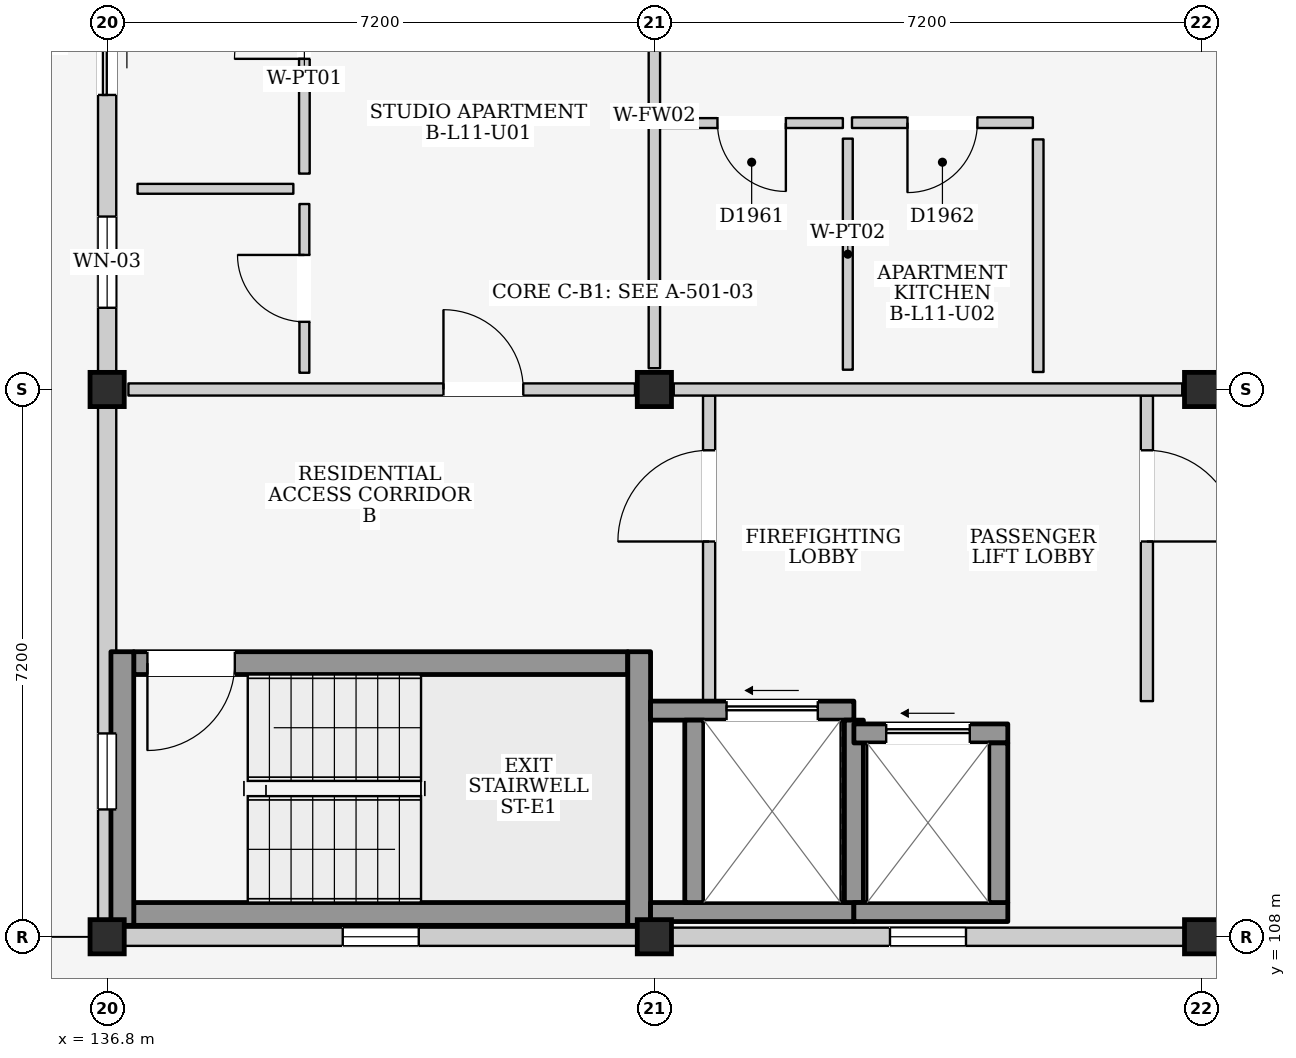
"""IFC4 building model, lengths in metres.
Left out: names, types, materials, properties, quantities, classifications, styles, units other than length and angle.
Written with IfcOpenShell. Run it as: python <this file> out.ifc"""

import sys

from ifc_helpers import new_model, si_unit, direction, frame, frame_2d, origin, origin_2d, place, context, subcontext, project, spatial, rectangle, extrude, element, fill, save


model = new_model("IFC4")
c1 = context("Model", 3, precision=1e-05, world=origin(), true_north=direction((0.0, 1.0)))
c2 = subcontext(c1, "Body", "Model", "MODEL_VIEW")
j1 = project(units=[si_unit("LENGTHUNIT", "METRE"), si_unit("PLANEANGLEUNIT", "RADIAN")], contexts=[c1])
p1 = place(None, origin())
s1 = spatial("IfcSite", under=j1, at=p1, CompositionType="ELEMENT")
p2 = place(p1, origin())
s2 = spatial("IfcBuilding", under=s1, at=p2, CompositionType="ELEMENT")
p3 = place(p2, frame((0.0, 0.0, 38.0)))
s3 = spatial("IfcBuildingStorey", under=s2, at=p3, CompositionType="ELEMENT", Elevation=38.0)
for number, where, z_axis, x_axis in (
    (1, (136.8, 108.0, 0.0), (0.0, 0.0, 1.0), (1.0, 0.0, 0.0)),
    (2, (136.8, 115.2, 0.0), (0.0, 0.0, 1.0), (1.0, 0.0, 0.0)),
    (3, (144.0, 108.0, 0.0), (0.0, 0.0, 1.0), (1.0, 0.0, 0.0)),
    (4, (144.0, 115.2, 0.0), (0.0, 0.0, 1.0), (1.0, 0.0, 0.0)),
    (5, (151.2, 108.0, 0.0), (0.0, 0.0, 1.0), (1.0, 0.0, 0.0)),
    (6, (151.2, 115.2, 0.0), (0.0, 0.0, 1.0), (1.0, 0.0, 0.0)),
):
    element("IfcColumn", number, at=place(p3, frame(where, z_axis=z_axis, x_axis=x_axis)), inside=s3, PredefinedType="COLUMN", context=c2, shape_type="SweptSolid", body=[
        extrude(rectangle(XDim=0.45, YDim=0.45, at=origin_2d()), origin(), (0.0, 0.0, 1.0), 3.2),
    ])
p4 = place(p3, frame((137.025, 108.0, 0.0), z_axis=(0.0, 0.0, 1.0), x_axis=(1.0, 0.0, 0.0)))
e7 = element("IfcWall", 7, at=p4, inside=s3, PredefinedType="ELEMENTEDWALL", context=c2, shape_type="SweptSolid", body=[
    extrude(rectangle(XDim=6.75, YDim=0.24, at=frame_2d((3.375, 0.0))), origin(), (0.0, 0.0, 1.0), 2.375),
])
p5 = place(p4, frame((2.875, 0.0, 1.2)))
e8 = element("IfcOpeningElement", 8, at=p5, cuts=e7, PredefinedType="OPENING", context=c2, shape_type="SweptSolid", body=[
    extrude(rectangle(XDim=1.0, YDim=0.9, at=frame_2d((0.5, 0.45))), frame((0.0, 0.135, 0.0), z_axis=(0.0, -1.0, 0.0), x_axis=(1.0, 0.0, 0.0)), (0.0, 0.0, 1.0), 0.27),
])
p6 = place(p3, frame((136.8, 108.225, 0.0), z_axis=(0.0, 0.0, 1.0), x_axis=(0.0, 1.0, 0.0)))
e9 = element("IfcWall", 9, at=p6, inside=s3, PredefinedType="ELEMENTEDWALL", context=c2, shape_type="SweptSolid", body=[
    extrude(rectangle(XDim=6.75, YDim=0.24, at=frame_2d((3.375, 0.0))), origin(), (0.0, 0.0, 1.0), 2.475),
])
p7 = place(p6, frame((1.45, 0.0, 1.2)))
e10 = element("IfcOpeningElement", 10, at=p7, cuts=e9, PredefinedType="OPENING", context=c2, shape_type="SweptSolid", body=[
    extrude(rectangle(XDim=1.0, YDim=0.9, at=frame_2d((0.5, 0.45))), frame((0.0, 0.135, 0.0), z_axis=(0.0, -1.0, 0.0), x_axis=(1.0, 0.0, 0.0)), (0.0, 0.0, 1.0), 0.27),
])
p8 = place(p3, frame((136.8, 115.425, 0.0), z_axis=(0.0, 0.0, 1.0), x_axis=(0.0, 1.0, 0.0)))
e11 = element("IfcWall", 11, at=p8, inside=s3, PredefinedType="ELEMENTEDWALL", context=c2, shape_type="SweptSolid", body=[
    extrude(rectangle(XDim=6.75, YDim=0.24, at=frame_2d((3.375, 0.0))), origin(), (0.0, 0.0, 1.0), 2.475),
])
p9 = place(p8, frame((3.65, 0.0, 0.0)))
e12 = element("IfcOpeningElement", 12, at=p9, cuts=e11, PredefinedType="OPENING", context=c2, shape_type="SweptSolid", body=[
    extrude(rectangle(XDim=1.4, YDim=2.1, at=frame_2d((0.7, 1.05))), frame((0.0, 0.135, 0.0), z_axis=(0.0, -1.0, 0.0), x_axis=(1.0, 0.0, 0.0)), (0.0, 0.0, 1.0), 0.27),
])
p10 = place(p8, frame((0.85, 0.0, 0.95)))
e13 = element("IfcOpeningElement", 13, at=p10, cuts=e11, PredefinedType="OPENING", context=c2, shape_type="SweptSolid", body=[
    extrude(rectangle(XDim=1.2, YDim=1.35, at=frame_2d((0.6, 0.675))), frame((0.0, 0.135, 0.0), z_axis=(0.0, -1.0, 0.0), x_axis=(1.0, 0.0, 0.0)), (0.0, 0.0, 1.0), 0.27),
])
p11 = place(p3, frame((144.225, 108.0, 0.0), z_axis=(0.0, 0.0, 1.0), x_axis=(1.0, 0.0, 0.0)))
e14 = element("IfcWall", 14, at=p11, inside=s3, PredefinedType="ELEMENTEDWALL", context=c2, shape_type="SweptSolid", body=[
    extrude(rectangle(XDim=6.75, YDim=0.24, at=frame_2d((3.375, 0.0))), origin(), (0.0, 0.0, 1.0), 2.375),
])
p12 = place(p11, frame((2.875, 0.0, 1.2)))
e15 = element("IfcOpeningElement", 15, at=p12, cuts=e14, PredefinedType="OPENING", context=c2, shape_type="SweptSolid", body=[
    extrude(rectangle(XDim=1.0, YDim=0.9, at=frame_2d((0.5, 0.45))), frame((0.0, 0.135, 0.0), z_axis=(0.0, -1.0, 0.0), x_axis=(1.0, 0.0, 0.0)), (0.0, 0.0, 1.0), 0.27),
])
p13 = place(p3, frame((137.15, 108.3, 0.0), z_axis=(0.0, 0.0, 1.0), x_axis=(1.0, 0.0, 0.0)))
e16 = element("IfcWall", 16, at=p13, inside=s3, PredefinedType="SHEAR", context=c2, shape_type="SweptSolid", body=[
    extrude(rectangle(XDim=6.5, YDim=0.3, at=frame_2d((3.25, 0.0))), origin(), (0.0, 0.0, 1.0), 2.99),
])
p14 = place(p3, frame((137.15, 111.6, 0.0), z_axis=(0.0, 0.0, 1.0), x_axis=(1.0, 0.0, 0.0)))
e17 = element("IfcWall", 17, at=p14, inside=s3, PredefinedType="SHEAR", context=c2, shape_type="SweptSolid", body=[
    extrude(rectangle(XDim=6.5, YDim=0.3, at=frame_2d((3.25, 0.0))), origin(), (0.0, 0.0, 1.0), 2.99),
])
p15 = place(p14, frame((0.18, 0.0, 0.0)))
e18 = element("IfcOpeningElement", 18, at=p15, cuts=e17, PredefinedType="OPENING", context=c2, shape_type="SweptSolid", body=[
    extrude(rectangle(XDim=1.15, YDim=2.2, at=frame_2d((0.575, 1.1))), frame((0.0, 0.165, 0.0), z_axis=(0.0, -1.0, 0.0), x_axis=(1.0, 0.0, 0.0)), (0.0, 0.0, 1.0), 0.33),
])
for number, where, z_axis, x_axis in (
    (19, (137.0, 108.15, 0.0), (0.0, 0.0, 1.0), (0.0, 1.0, 0.0)),
    (20, (143.8, 108.15, 0.0), (0.0, 0.0, 1.0), (0.0, 1.0, 0.0)),
):
    element("IfcWall", number, at=place(p3, frame(where, z_axis=z_axis, x_axis=x_axis)), inside=s3, PredefinedType="SHEAR", context=c2, shape_type="SweptSolid", body=[
        extrude(rectangle(XDim=3.6, YDim=0.3, at=frame_2d((1.8, 0.0))), origin(), (0.0, 0.0, 1.0), 2.99),
    ])
p16 = place(p3, frame((144.72, 111.1, 0.0), z_axis=(0.0, 0.0, 1.0), x_axis=(0.0, 1.0, 0.0)))
e21 = element("IfcWall", 21, at=p16, inside=s3, PredefinedType="PARTITIONING", context=c2, shape_type="SweptSolid", body=[
    extrude(rectangle(XDim=4.02, YDim=0.16, at=frame_2d((2.01, 0.0))), origin(), (0.0, 0.0, 1.0), 2.99),
])
p17 = place(p16, frame((2.1, 0.0, 0.0)))
e22 = element("IfcOpeningElement", 22, at=p17, cuts=e21, PredefinedType="OPENING", context=c2, shape_type="SweptSolid", body=[
    extrude(rectangle(XDim=1.2, YDim=2.2, at=frame_2d((0.6, 1.1))), frame((0.0, 0.095, 0.0), z_axis=(0.0, -1.0, 0.0), x_axis=(1.0, 0.0, 0.0)), (0.0, 0.0, 1.0), 0.19),
])
p18 = place(p3, frame((150.48, 111.1, 0.0), z_axis=(0.0, 0.0, 1.0), x_axis=(0.0, 1.0, 0.0)))
e23 = element("IfcWall", 23, at=p18, inside=s3, PredefinedType="PARTITIONING", context=c2, shape_type="SweptSolid", body=[
    extrude(rectangle(XDim=4.02, YDim=0.16, at=frame_2d((2.01, 0.0))), origin(), (0.0, 0.0, 1.0), 2.99),
])
p19 = place(p18, frame((2.1, 0.0, 0.0)))
e24 = element("IfcOpeningElement", 24, at=p19, cuts=e23, PredefinedType="OPENING", context=c2, shape_type="SweptSolid", body=[
    extrude(rectangle(XDim=1.2, YDim=2.2, at=frame_2d((0.6, 1.1))), frame((0.0, 0.095, 0.0), z_axis=(0.0, -1.0, 0.0), x_axis=(1.0, 0.0, 0.0)), (0.0, 0.0, 1.0), 0.19),
])
p20 = place(p3, frame((143.95, 108.325, 0.0), z_axis=(0.0, 0.0, 1.0), x_axis=(1.0, 0.0, 0.0)))
e25 = element("IfcWall", 25, at=p20, inside=s3, PredefinedType="SHEAR", context=c2, shape_type="SweptSolid", body=[
    extrude(rectangle(XDim=2.675, YDim=0.25, at=frame_2d((1.337, 0.0))), origin(), (0.0, 0.0, 1.0), 2.99),
])
p21 = place(p3, frame((143.95, 110.975, 0.0), z_axis=(0.0, 0.0, 1.0), x_axis=(1.0, 0.0, 0.0)))
e26 = element("IfcWall", 26, at=p21, inside=s3, PredefinedType="SHEAR", context=c2, shape_type="SweptSolid", body=[
    extrude(rectangle(XDim=2.675, YDim=0.25, at=frame_2d((1.337, 0.0))), origin(), (0.0, 0.0, 1.0), 2.99),
])
p22 = place(p21, frame((1.0, 0.0, 0.0)))
e27 = element("IfcOpeningElement", 27, at=p22, cuts=e26, PredefinedType="OPENING", context=c2, shape_type="SweptSolid", body=[
    extrude(rectangle(XDim=1.2, YDim=2.25, at=frame_2d((0.6, 1.125))), frame((0.0, 0.14, 0.0), z_axis=(0.0, -1.0, 0.0), x_axis=(1.0, 0.0, 0.0)), (0.0, 0.0, 1.0), 0.28),
])
for number, where, z_axis, x_axis in (
    (28, (144.525, 108.45, 0.0), (0.0, 0.0, 1.0), (0.0, 1.0, 0.0)),
    (29, (146.625, 108.45, 0.0), (0.0, 0.0, 1.0), (0.0, 1.0, 0.0)),
):
    element("IfcWall", number, at=place(p3, frame(where, z_axis=z_axis, x_axis=x_axis)), inside=s3, PredefinedType="SHEAR", context=c2, shape_type="SweptSolid", body=[
        extrude(rectangle(XDim=2.4, YDim=0.25, at=frame_2d((1.2, 0.0))), origin(), (0.0, 0.0, 1.0), 2.99),
    ])
p23 = place(p3, frame((146.625, 108.325, 0.0), z_axis=(0.0, 0.0, 1.0), x_axis=(1.0, 0.0, 0.0)))
e30 = element("IfcWall", 30, at=p23, inside=s3, PredefinedType="SHEAR", context=c2, shape_type="SweptSolid", body=[
    extrude(rectangle(XDim=2.025, YDim=0.25, at=frame_2d((1.012, 0.0))), origin(), (0.0, 0.0, 1.0), 2.99),
])
p24 = place(p3, frame((146.625, 110.675, 0.0), z_axis=(0.0, 0.0, 1.0), x_axis=(1.0, 0.0, 0.0)))
e31 = element("IfcWall", 31, at=p24, inside=s3, PredefinedType="SHEAR", context=c2, shape_type="SweptSolid", body=[
    extrude(rectangle(XDim=2.025, YDim=0.25, at=frame_2d((1.012, 0.0))), origin(), (0.0, 0.0, 1.0), 2.99),
])
p25 = place(p24, frame((0.425, 0.0, 0.0)))
e32 = element("IfcOpeningElement", 32, at=p25, cuts=e31, PredefinedType="OPENING", context=c2, shape_type="SweptSolid", body=[
    extrude(rectangle(XDim=1.1, YDim=2.15, at=frame_2d((0.55, 1.075))), frame((0.0, 0.14, 0.0), z_axis=(0.0, -1.0, 0.0), x_axis=(1.0, 0.0, 0.0)), (0.0, 0.0, 1.0), 0.28),
])
p26 = place(p3, frame((148.525, 108.45, 0.0), z_axis=(0.0, 0.0, 1.0), x_axis=(0.0, 1.0, 0.0)))
e33 = element("IfcWall", 33, at=p26, inside=s3, PredefinedType="SHEAR", context=c2, shape_type="SweptSolid", body=[
    extrude(rectangle(XDim=2.1, YDim=0.25, at=frame_2d((1.05, 0.0))), origin(), (0.0, 0.0, 1.0), 2.99),
])
p27 = place(p3, frame((137.08, 115.2, 0.0), z_axis=(0.0, 0.0, 1.0), x_axis=(1.0, 0.0, 0.0)))
e34 = element("IfcWall", 34, at=p27, inside=s3, PredefinedType="PARTITIONING", context=c2, shape_type="SweptSolid", body=[
    extrude(rectangle(XDim=6.665, YDim=0.16, at=frame_2d((3.333, 0.0))), origin(), (0.0, 0.0, 1.0), 2.375),
])
p28 = place(p27, frame((4.145, 0.0, 0.0)))
e35 = element("IfcOpeningElement", 35, at=p28, cuts=e34, PredefinedType="OPENING", context=c2, shape_type="SweptSolid", body=[
    extrude(rectangle(XDim=1.05, YDim=2.15, at=frame_2d((0.525, 1.075))), frame((0.0, 0.095, 0.0), z_axis=(0.0, -1.0, 0.0), x_axis=(1.0, 0.0, 0.0)), (0.0, 0.0, 1.0), 0.19),
])
p29 = place(p3, frame((144.0, 115.48, 0.0), z_axis=(0.0, 0.0, 1.0), x_axis=(0.0, 1.0, 0.0)))
e36 = element("IfcWall", 36, at=p29, inside=s3, PredefinedType="PARTITIONING", context=c2, shape_type="SweptSolid", body=[
    extrude(rectangle(XDim=6.64, YDim=0.15, at=frame_2d((3.32, 0.0))), origin(), (0.0, 0.0, 1.0), 2.475),
])
p30 = place(p3, frame((137.2, 117.84, 0.0), z_axis=(0.0, 0.0, 1.0), x_axis=(1.0, 0.0, 0.0)))
e37 = element("IfcWall", 37, at=p30, inside=s3, PredefinedType="PARTITIONING", context=c2, shape_type="SweptSolid", body=[
    extrude(rectangle(XDim=2.05, YDim=0.13, at=frame_2d((1.025, 0.0))), origin(), (0.0, 0.0, 1.0), 2.99),
])
p31 = place(p3, frame((139.395, 115.42, 0.0), z_axis=(0.0, 0.0, 1.0), x_axis=(0.0, 1.0, 0.0)))
e38 = element("IfcWall", 38, at=p31, inside=s3, PredefinedType="PARTITIONING", context=c2, shape_type="SweptSolid", body=[
    extrude(rectangle(XDim=2.22, YDim=0.13, at=frame_2d((1.11, 0.0))), origin(), (0.0, 0.0, 1.0), 2.99),
])
p32 = place(p31, frame((0.67, 0.0, 0.0)))
e39 = element("IfcOpeningElement", 39, at=p32, cuts=e38, PredefinedType="OPENING", context=c2, shape_type="SweptSolid", body=[
    extrude(rectangle(XDim=0.88, YDim=2.1, at=frame_2d((0.44, 1.05))), frame((0.0, 0.08, 0.0), z_axis=(0.0, -1.0, 0.0), x_axis=(1.0, 0.0, 0.0)), (0.0, 0.0, 1.0), 0.16),
])
p33 = place(p3, frame((139.395, 118.04, 0.0), z_axis=(0.0, 0.0, 1.0), x_axis=(0.0, 1.0, 0.0)))
e40 = element("IfcWall", 40, at=p33, inside=s3, PredefinedType="PARTITIONING", context=c2, shape_type="SweptSolid", body=[
    extrude(rectangle(XDim=3.94, YDim=0.14, at=frame_2d((1.97, 0.0))), origin(), (0.0, 0.0, 1.0), 2.99),
])
p34 = place(p33, frame((1.51, 0.0, 0.0)))
e41 = element("IfcOpeningElement", 41, at=p34, cuts=e40, PredefinedType="OPENING", context=c2, shape_type="SweptSolid", body=[
    extrude(rectangle(XDim=0.92, YDim=2.1, at=frame_2d((0.46, 1.05))), frame((0.0, 0.085, 0.0), z_axis=(0.0, -1.0, 0.0), x_axis=(1.0, 0.0, 0.0)), (0.0, 0.0, 1.0), 0.17),
])
p35 = place(p3, frame((144.255, 115.2, 0.0), z_axis=(0.0, 0.0, 1.0), x_axis=(1.0, 0.0, 0.0)))
e42 = element("IfcWall", 42, at=p35, inside=s3, PredefinedType="PARTITIONING", context=c2, shape_type="SweptSolid", body=[
    extrude(rectangle(XDim=6.69, YDim=0.16, at=frame_2d((3.345, 0.0))), origin(), (0.0, 0.0, 1.0), 2.375),
])
p36 = place(p3, frame((144.08, 118.705, 0.0), z_axis=(0.0, 0.0, 1.0), x_axis=(1.0, 0.0, 0.0)))
e43 = element("IfcWall", 43, at=p36, inside=s3, PredefinedType="PARTITIONING", context=c2, shape_type="SweptSolid", body=[
    extrude(rectangle(XDim=2.4, YDim=0.13, at=frame_2d((1.2, 0.0))), origin(), (0.0, 0.0, 1.0), 2.99),
])
p37 = place(p36, frame((0.75, 0.0, 0.0)))
e44 = element("IfcOpeningElement", 44, at=p37, cuts=e43, PredefinedType="OPENING", context=c2, shape_type="SweptSolid", body=[
    extrude(rectangle(XDim=0.9, YDim=2.1, at=frame_2d((0.45, 1.05))), frame((0.0, 0.08, 0.0), z_axis=(0.0, -1.0, 0.0), x_axis=(1.0, 0.0, 0.0)), (0.0, 0.0, 1.0), 0.16),
])
p38 = place(p3, frame((146.545, 115.46, 0.0), z_axis=(0.0, 0.0, 1.0), x_axis=(0.0, 1.0, 0.0)))
e45 = element("IfcWall", 45, at=p38, inside=s3, PredefinedType="PARTITIONING", context=c2, shape_type="SweptSolid", body=[
    extrude(rectangle(XDim=3.04, YDim=0.13, at=frame_2d((1.52, 0.0))), origin(), (0.0, 0.0, 1.0), 2.99),
])
p39 = place(p3, frame((146.6, 118.71, 0.0), z_axis=(0.0, 0.0, 1.0), x_axis=(1.0, 0.0, 0.0)))
e46 = element("IfcWall", 46, at=p39, inside=s3, PredefinedType="PARTITIONING", context=c2, shape_type="SweptSolid", body=[
    extrude(rectangle(XDim=2.38, YDim=0.14, at=frame_2d((1.19, 0.0))), origin(), (0.0, 0.0, 1.0), 2.99),
])
p40 = place(p39, frame((0.73, 0.0, 0.0)))
e47 = element("IfcOpeningElement", 47, at=p40, cuts=e46, PredefinedType="OPENING", context=c2, shape_type="SweptSolid", body=[
    extrude(rectangle(XDim=0.92, YDim=2.1, at=frame_2d((0.46, 1.05))), frame((0.0, 0.085, 0.0), z_axis=(0.0, -1.0, 0.0), x_axis=(1.0, 0.0, 0.0)), (0.0, 0.0, 1.0), 0.17),
])
p41 = place(p3, frame((149.05, 115.43, 0.0), z_axis=(0.0, 0.0, 1.0), x_axis=(0.0, 1.0, 0.0)))
e48 = element("IfcWall", 48, at=p41, inside=s3, PredefinedType="PARTITIONING", context=c2, shape_type="SweptSolid", body=[
    extrude(rectangle(XDim=3.06, YDim=0.14, at=frame_2d((1.53, 0.0))), origin(), (0.0, 0.0, 1.0), 2.99),
])
p42 = place(p5, origin())
e49 = element("IfcWindow", 49, at=p42, inside=s3, PartitioningType="SINGLE_PANEL", PredefinedType="WINDOW", context=c2, shape_type="SweptSolid", body=[
    extrude(rectangle(XDim=1.0, YDim=0.9, at=frame_2d((0.5, 0.45))), frame((0.0, 0.03, 0.0), z_axis=(0.0, -1.0, 0.0), x_axis=(1.0, 0.0, 0.0)), (0.0, 0.0, 1.0), 0.06),
])
fill(e8, e49)
p43 = place(p7, origin())
e50 = element("IfcWindow", 50, at=p43, inside=s3, PartitioningType="SINGLE_PANEL", PredefinedType="WINDOW", context=c2, shape_type="SweptSolid", body=[
    extrude(rectangle(XDim=1.0, YDim=0.9, at=frame_2d((0.5, 0.45))), frame((0.0, 0.03, 0.0), z_axis=(0.0, -1.0, 0.0), x_axis=(1.0, 0.0, 0.0)), (0.0, 0.0, 1.0), 0.06),
])
fill(e10, e50)
p44 = place(p9, frame((1.4, 0.0, 0.0), z_axis=(0.0, 0.0, 1.0), x_axis=(-1.0, 0.0, 0.0)))
e51 = element("IfcDoor", 51, at=p44, inside=s3, OperationType="SLIDING_TO_RIGHT", PredefinedType="DOOR", context=c2, shape_type="SweptSolid", body=[
    extrude(rectangle(XDim=1.4, YDim=2.1, at=frame_2d((0.7, 1.05))), frame((0.0, 0.025, 0.0), z_axis=(0.0, -1.0, 0.0), x_axis=(1.0, 0.0, 0.0)), (0.0, 0.0, 1.0), 0.05),
])
fill(e12, e51)
p45 = place(p10, origin())
e52 = element("IfcWindow", 52, at=p45, inside=s3, PartitioningType="SINGLE_PANEL", PredefinedType="WINDOW", context=c2, shape_type="SweptSolid", body=[
    extrude(rectangle(XDim=1.2, YDim=1.35, at=frame_2d((0.6, 0.675))), frame((0.0, 0.03, 0.0), z_axis=(0.0, -1.0, 0.0), x_axis=(1.0, 0.0, 0.0)), (0.0, 0.0, 1.0), 0.06),
])
fill(e13, e52)
p46 = place(p12, origin())
e53 = element("IfcWindow", 53, at=p46, inside=s3, PartitioningType="SINGLE_PANEL", PredefinedType="WINDOW", context=c2, shape_type="SweptSolid", body=[
    extrude(rectangle(XDim=1.0, YDim=0.9, at=frame_2d((0.5, 0.45))), frame((0.0, 0.03, 0.0), z_axis=(0.0, -1.0, 0.0), x_axis=(1.0, 0.0, 0.0)), (0.0, 0.0, 1.0), 0.06),
])
fill(e15, e53)
p47 = place(p15, frame((1.15, 0.0, 0.0), z_axis=(0.0, 0.0, 1.0), x_axis=(-1.0, 0.0, 0.0)))
e54 = element("IfcDoor", 54, at=p47, inside=s3, OperationType="SINGLE_SWING_RIGHT", PredefinedType="DOOR", context=c2, shape_type="SweptSolid", body=[
    extrude(rectangle(XDim=1.15, YDim=2.2, at=frame_2d((0.575, 1.1))), frame((0.0, 0.025, 0.0), z_axis=(0.0, -1.0, 0.0), x_axis=(1.0, 0.0, 0.0)), (0.0, 0.0, 1.0), 0.05),
])
fill(e18, e54)
p48 = place(p17, origin())
e55 = element("IfcDoor", 55, at=p48, inside=s3, OperationType="SINGLE_SWING_LEFT", PredefinedType="DOOR", context=c2, shape_type="SweptSolid", body=[
    extrude(rectangle(XDim=1.2, YDim=2.2, at=frame_2d((0.6, 1.1))), frame((0.0, 0.025, 0.0), z_axis=(0.0, -1.0, 0.0), x_axis=(1.0, 0.0, 0.0)), (0.0, 0.0, 1.0), 0.05),
])
fill(e22, e55)
p49 = place(p19, frame((1.2, 0.0, 0.0), z_axis=(0.0, 0.0, 1.0), x_axis=(-1.0, 0.0, 0.0)))
e56 = element("IfcDoor", 56, at=p49, inside=s3, OperationType="SINGLE_SWING_RIGHT", PredefinedType="DOOR", context=c2, shape_type="SweptSolid", body=[
    extrude(rectangle(XDim=1.2, YDim=2.2, at=frame_2d((0.6, 1.1))), frame((0.0, 0.025, 0.0), z_axis=(0.0, -1.0, 0.0), x_axis=(1.0, 0.0, 0.0)), (0.0, 0.0, 1.0), 0.05),
])
fill(e24, e56)
p50 = place(p22, origin())
e57 = element("IfcDoor", 57, at=p50, inside=s3, OperationType="SLIDING_TO_LEFT", PredefinedType="DOOR", context=c2, shape_type="SweptSolid", body=[
    extrude(rectangle(XDim=1.2, YDim=2.25, at=frame_2d((0.6, 1.125))), frame((0.0, 0.025, 0.0), z_axis=(0.0, -1.0, 0.0), x_axis=(1.0, 0.0, 0.0)), (0.0, 0.0, 1.0), 0.05),
])
fill(e27, e57)
p51 = place(p25, origin())
e58 = element("IfcDoor", 58, at=p51, inside=s3, OperationType="SLIDING_TO_LEFT", PredefinedType="DOOR", context=c2, shape_type="SweptSolid", body=[
    extrude(rectangle(XDim=1.1, YDim=2.15, at=frame_2d((0.55, 1.075))), frame((0.0, 0.025, 0.0), z_axis=(0.0, -1.0, 0.0), x_axis=(1.0, 0.0, 0.0)), (0.0, 0.0, 1.0), 0.05),
])
fill(e32, e58)
p52 = place(p28, origin())
e59 = element("IfcDoor", 59, at=p52, inside=s3, OperationType="SINGLE_SWING_LEFT", PredefinedType="DOOR", context=c2, shape_type="SweptSolid", body=[
    extrude(rectangle(XDim=1.05, YDim=2.15, at=frame_2d((0.525, 1.075))), frame((0.0, 0.025, 0.0), z_axis=(0.0, -1.0, 0.0), x_axis=(1.0, 0.0, 0.0)), (0.0, 0.0, 1.0), 0.05),
])
fill(e35, e59)
p53 = place(p32, origin())
e60 = element("IfcDoor", 60, at=p53, inside=s3, OperationType="SINGLE_SWING_RIGHT", PredefinedType="DOOR", context=c2, shape_type="SweptSolid", body=[
    extrude(rectangle(XDim=0.88, YDim=2.1, at=frame_2d((0.44, 1.05))), frame((0.0, 0.025, 0.0), z_axis=(0.0, -1.0, 0.0), x_axis=(1.0, 0.0, 0.0)), (0.0, 0.0, 1.0), 0.05),
])
fill(e39, e60)
p54 = place(p34, origin())
e61 = element("IfcDoor", 61, at=p54, inside=s3, OperationType="SINGLE_SWING_LEFT", PredefinedType="DOOR", context=c2, shape_type="SweptSolid", body=[
    extrude(rectangle(XDim=0.92, YDim=2.1, at=frame_2d((0.46, 1.05))), frame((0.0, 0.025, 0.0), z_axis=(0.0, -1.0, 0.0), x_axis=(1.0, 0.0, 0.0)), (0.0, 0.0, 1.0), 0.05),
])
fill(e41, e61)
p55 = place(p37, frame((0.9, 0.0, 0.0), z_axis=(0.0, 0.0, 1.0), x_axis=(-1.0, 0.0, 0.0)))
e62 = element("IfcDoor", 62, at=p55, inside=s3, OperationType="SINGLE_SWING_LEFT", PredefinedType="DOOR", context=c2, shape_type="SweptSolid", body=[
    extrude(rectangle(XDim=0.9, YDim=2.1, at=frame_2d((0.45, 1.05))), frame((0.0, 0.025, 0.0), z_axis=(0.0, -1.0, 0.0), x_axis=(1.0, 0.0, 0.0)), (0.0, 0.0, 1.0), 0.05),
])
fill(e44, e62)
p56 = place(p40, frame((0.92, 0.0, 0.0), z_axis=(0.0, 0.0, 1.0), x_axis=(-1.0, 0.0, 0.0)))
e63 = element("IfcDoor", 63, at=p56, inside=s3, OperationType="SINGLE_SWING_RIGHT", PredefinedType="DOOR", context=c2, shape_type="SweptSolid", body=[
    extrude(rectangle(XDim=0.92, YDim=2.1, at=frame_2d((0.46, 1.05))), frame((0.0, 0.025, 0.0), z_axis=(0.0, -1.0, 0.0), x_axis=(1.0, 0.0, 0.0)), (0.0, 0.0, 1.0), 0.05),
])
fill(e47, e63)
save(model, sys.argv[1])
